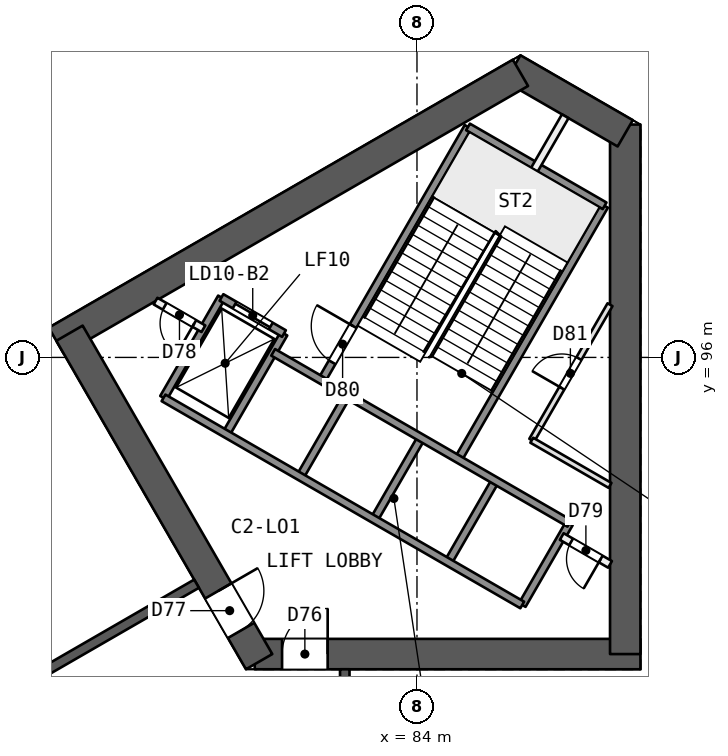
"""IFC4 building model, lengths in metres.
Left out: names, types, materials, properties, quantities, classifications, styles, units other than length and angle.
Written with IfcOpenShell. Run it as: python <this file> out.ifc"""

import sys

from ifc_helpers import new_model, si_unit, direction, frame, frame_2d, origin, place, context, subcontext, project, spatial, rectangle, extrude, element, fill, save


model = new_model("IFC4")
c1 = context("Model", 3, precision=1e-05, world=origin(), true_north=direction((0.0, 1.0)))
c2 = subcontext(c1, "Body", "Model", "MODEL_VIEW")
j1 = project(units=[si_unit("LENGTHUNIT", "METRE"), si_unit("PLANEANGLEUNIT", "RADIAN")], contexts=[c1])
p1 = place(None, origin())
s1 = spatial("IfcSite", under=j1, at=p1, CompositionType="ELEMENT")
p2 = place(p1, origin())
s2 = spatial("IfcBuilding", under=s1, at=p2, CompositionType="ELEMENT")
p3 = place(p2, frame((0.0, 0.0, -9.0)))
s3 = spatial("IfcBuildingStorey", under=s2, at=p3, CompositionType="ELEMENT", Elevation=-9.0)
p4 = place(p3, frame((94.84, 122.4, -0.3), z_axis=(0.0, 0.0, 1.0), x_axis=(-0.866026157749, -0.499998694092, 0.0)))
e1 = element("IfcWall", 1, at=p4, inside=s3, PredefinedType="SOLIDWALL", context=c2, shape_type="SweptSolid", body=[
    extrude(rectangle(XDim=76.937, YDim=0.6, at=frame_2d((38.469, 0.0))), origin(), (0.0, 0.0, 1.0), 4.8),
])
p5 = place(p3, frame((79.731, 88.194, -0.3), z_axis=(0.0, 0.0, 1.0), x_axis=(1.0, 0.0, 0.0)))
e2 = element("IfcWall", 2, at=p5, inside=s3, PredefinedType="SHEAR", context=c2, shape_type="SweptSolid", body=[
    extrude(rectangle(XDim=10.149, YDim=0.8, at=frame_2d((5.074, 0.0))), origin(), (0.0, 0.0, 1.0), 4.8),
])
p6 = place(p5, frame((0.719, 0.0, 0.3)))
e3 = element("IfcOpeningElement", 3, at=p6, cuts=e2, PredefinedType="OPENING", context=c2, shape_type="SweptSolid", body=[
    extrude(rectangle(XDim=1.2, YDim=2.1, at=frame_2d((0.6, 1.05))), frame((0.0, 0.411, 0.0), z_axis=(0.0, -1.0, 0.0), x_axis=(1.0, 0.0, 0.0)), (0.0, 0.0, 1.0), 0.821),
])
p7 = place(p3, frame((89.48, 88.194, -0.3), z_axis=(0.0, 0.0, 1.0), x_axis=(0.0, 1.0, 0.0)))
e4 = element("IfcWall", 4, at=p7, inside=s3, PredefinedType="SHEAR", context=c2, shape_type="SweptSolid", body=[
    extrude(rectangle(XDim=13.933, YDim=0.8, at=frame_2d((6.967, 0.0))), origin(), (0.0, 0.0, 1.0), 4.8),
])
p8 = place(p3, frame((89.48, 101.897, -0.3), z_axis=(0.0, 0.0, 1.0), x_axis=(-0.866034355626, 0.499984494636, 0.0)))
e5 = element("IfcWall", 5, at=p8, inside=s3, PredefinedType="SHEAR", context=c2, shape_type="SweptSolid", body=[
    extrude(rectangle(XDim=3.414, YDim=0.8, at=frame_2d((1.707, 0.0))), origin(), (0.0, 0.0, 1.0), 4.8),
])
p9 = place(p3, frame((86.723, 103.488, -0.3), z_axis=(0.0, 0.0, 1.0), x_axis=(-0.866032504327, -0.499987701298, 0.0)))
e6 = element("IfcWall", 6, at=p9, inside=s3, PredefinedType="SHEAR", context=c2, shape_type="SweptSolid", body=[
    extrude(rectangle(XDim=14.102, YDim=0.8, at=frame_2d((7.051, 0.0))), origin(), (0.0, 0.0, 1.0), 4.8),
])
p10 = place(p3, frame((74.856, 96.637, -0.3), z_axis=(0.0, 0.0, 1.0), x_axis=(0.499993500917, -0.866029155999, 0.0)))
e7 = element("IfcWall", 7, at=p10, inside=s3, PredefinedType="SHEAR", context=c2, shape_type="SweptSolid", body=[
    extrude(rectangle(XDim=9.98, YDim=0.8, at=frame_2d((4.99, 0.0))), origin(), (0.0, 0.0, 1.0), 4.8),
])
p11 = place(p10, frame((7.83, 0.0, 0.3)))
e8 = element("IfcOpeningElement", 8, at=p11, cuts=e7, PredefinedType="OPENING", context=c2, shape_type="SweptSolid", body=[
    extrude(rectangle(XDim=1.2, YDim=2.1, at=frame_2d((0.6, 1.05))), frame((0.0, 0.411, 0.0), z_axis=(0.0, -1.0, 0.0), x_axis=(1.0, 0.0, 0.0)), (0.0, 0.0, 1.0), 0.821),
])
for number, where, z_axis, x_axis in (
    (9, (82.1, 72.206, -0.3), (0.0, 0.0, 1.0), (0.0, 1.0, 0.0)),
    (10, (78.2, 90.046, -0.3), (0.0, 0.0, 1.0), (-0.866, -0.5, 0.0)),
):
    element("IfcWall", number, at=place(p3, frame(where, z_axis=z_axis, x_axis=x_axis)), inside=s3, PredefinedType="SHEAR", context=c2, shape_type="SweptSolid", body=[
        extrude(rectangle(XDim=15.588, YDim=0.25, at=frame_2d((7.794, 0.0))), origin(), (0.0, 0.0, 1.0), 4.5),
    ])
p12 = place(p3, frame((86.77, 89.486, 0.0), z_axis=(0.0, 0.0, 1.0), x_axis=(0.499961042966, 0.86604789447, 0.0)))
e11 = element("IfcWall", 11, at=p12, inside=s3, PredefinedType="SOLIDWALL", context=c2, shape_type="SweptSolid", body=[
    extrude(rectangle(XDim=2.48, YDim=0.2, at=frame_2d((1.24, 0.0))), origin(), (0.0, 0.0, 1.0), 4.2),
])
p13 = place(p3, frame((87.021, 93.821, 0.0), z_axis=(0.0, 0.0, 1.0), x_axis=(0.500028662945, 0.866008854593, 0.0)))
e12 = element("IfcWall", 12, at=p13, inside=s3, PredefinedType="PARTITIONING", context=c2, shape_type="SweptSolid", body=[
    extrude(rectangle(XDim=4.118, YDim=0.15, at=frame_2d((2.059, 0.0))), origin(), (0.0, 0.0, 1.0), 4.2),
])
p14 = place(p13, frame((1.582, 0.0, 0.0)))
e13 = element("IfcOpeningElement", 13, at=p14, cuts=e12, PredefinedType="OPENING", context=c2, shape_type="SweptSolid", body=[
    extrude(rectangle(XDim=0.9, YDim=2.1, at=frame_2d((0.45, 1.05))), frame((0.0, 0.085, 0.0), z_axis=(0.0, -1.0, 0.0), x_axis=(1.0, 0.0, 0.0)), (0.0, 0.0, 1.0), 0.171),
])
p15 = place(p3, frame((84.821, 90.611, 0.0), z_axis=(0.0, 0.0, 1.0), x_axis=(0.499961042966, 0.86604789447, 0.0)))
e14 = element("IfcWall", 14, at=p15, inside=s3, PredefinedType="SOLIDWALL", context=c2, shape_type="SweptSolid", body=[
    extrude(rectangle(XDim=2.48, YDim=0.2, at=frame_2d((1.24, 0.0))), origin(), (0.0, 0.0, 1.0), 4.2),
])
p16 = place(p3, frame((85.087, 93.321, 0.0), z_axis=(0.0, 0.0, 1.0), x_axis=(0.500019787375, 0.866013979237, 0.0)))
e15 = element("IfcWall", 15, at=p16, inside=s3, PredefinedType="SOLIDWALL", context=c2, shape_type="SweptSolid", body=[
    extrude(rectangle(XDim=7.7, YDim=0.2, at=frame_2d((3.85, 0.0))), origin(), (0.0, 0.0, 1.0), 4.2),
])
p17 = place(p3, frame((82.873, 91.736, 0.0), z_axis=(0.0, 0.0, 1.0), x_axis=(0.499961042966, 0.86604789447, 0.0)))
e16 = element("IfcWall", 16, at=p17, inside=s3, PredefinedType="SOLIDWALL", context=c2, shape_type="SweptSolid", body=[
    extrude(rectangle(XDim=2.48, YDim=0.2, at=frame_2d((1.24, 0.0))), origin(), (0.0, 0.0, 1.0), 4.2),
])
p18 = place(p3, frame((87.09, 100.94, 0.0), z_axis=(0.0, 0.0, 1.0), x_axis=(0.499956811548, 0.866050337213, 0.0)))
e17 = element("IfcWall", 17, at=p18, inside=s3, PredefinedType="PARTITIONING", context=c2, shape_type="SweptSolid", body=[
    extrude(rectangle(XDim=1.623, YDim=0.2, at=frame_2d((0.812, 0.0))), origin(), (0.0, 0.0, 1.0), 4.2),
])
p19 = place(p3, frame((80.924, 92.861, 0.0), z_axis=(0.0, 0.0, 1.0), x_axis=(0.499961042966, 0.86604789447, 0.0)))
e18 = element("IfcWall", 18, at=p19, inside=s3, PredefinedType="SOLIDWALL", context=c2, shape_type="SweptSolid", body=[
    extrude(rectangle(XDim=2.48, YDim=0.2, at=frame_2d((1.24, 0.0))), origin(), (0.0, 0.0, 1.0), 4.2),
])
p20 = place(p3, frame((81.493, 95.396, 0.0), z_axis=(0.0, 0.0, 1.0), x_axis=(0.500006057782, 0.866021906294, 0.0)))
e19 = element("IfcWall", 19, at=p20, inside=s3, PredefinedType="SOLIDWALL", context=c2, shape_type="SweptSolid", body=[
    extrude(rectangle(XDim=7.7, YDim=0.2, at=frame_2d((3.85, 0.0))), origin(), (0.0, 0.0, 1.0), 4.2),
])
p21 = place(p20, frame((0.55, 0.0, 0.0)))
e20 = element("IfcOpeningElement", 20, at=p21, cuts=e19, PredefinedType="OPENING", context=c2, shape_type="SweptSolid", body=[
    extrude(rectangle(XDim=1.1, YDim=2.1, at=frame_2d((0.55, 1.05))), frame((0.0, 0.11, 0.0), z_axis=(0.0, -1.0, 0.0), x_axis=(1.0, 0.0, 0.0)), (0.0, 0.0, 1.0), 0.221),
])
for number, where, z_axis, x_axis in (
    (21, (78.976, 93.986, 0.0), (0.0, 0.0, 1.0), (0.5, 0.866, 0.0)),
    (22, (77.33, 94.936, 0.0), (0.0, 0.0, 1.0), (0.5, 0.866, 0.0)),
):
    element("IfcWall", number, at=place(p3, frame(where, z_axis=z_axis, x_axis=x_axis)), inside=s3, PredefinedType="SOLIDWALL", context=c2, shape_type="SweptSolid", body=[
        extrude(rectangle(XDim=3.05, YDim=0.2, at=frame_2d((1.525, 0.0))), origin(), (0.0, 0.0, 1.0), 4.2),
    ])
p22 = place(p3, frame((86.77, 89.486, 0.0), z_axis=(0.0, 0.0, 1.0), x_axis=(-0.86601811187, 0.500012629753, 0.0)))
e23 = element("IfcWall", 23, at=p22, inside=s3, PredefinedType="SOLIDWALL", context=c2, shape_type="SweptSolid", body=[
    extrude(rectangle(XDim=10.9, YDim=0.2, at=frame_2d((5.45, 0.0))), origin(), (0.0, 0.0, 1.0), 4.2),
])
p23 = place(p3, frame((89.08, 90.554, 0.0), z_axis=(0.0, 0.0, 1.0), x_axis=(-0.866022048785, 0.500005810984, 0.0)))
e24 = element("IfcWall", 24, at=p23, inside=s3, PredefinedType="PARTITIONING", context=c2, shape_type="SweptSolid", body=[
    extrude(rectangle(XDim=1.467, YDim=0.2, at=frame_2d((0.733, 0.0))), origin(), (0.0, 0.0, 1.0), 4.2),
])
p24 = place(p23, frame((0.283, 0.0, 0.0)))
e25 = element("IfcOpeningElement", 25, at=p24, cuts=e24, PredefinedType="OPENING", context=c2, shape_type="SweptSolid", body=[
    extrude(rectangle(XDim=0.9, YDim=2.1, at=frame_2d((0.45, 1.05))), frame((0.0, 0.11, 0.0), z_axis=(0.0, -1.0, 0.0), x_axis=(1.0, 0.0, 0.0)), (0.0, 0.0, 1.0), 0.221),
])
p25 = place(p3, frame((78.38, 96.755, 0.0), z_axis=(0.0, 0.0, 1.0), x_axis=(-0.866003949776, 0.500037157592, 0.0)))
e26 = element("IfcWall", 26, at=p25, inside=s3, PredefinedType="PARTITIONING", context=c2, shape_type="SweptSolid", body=[
    extrude(rectangle(XDim=1.455, YDim=0.2, at=frame_2d((0.728, 0.0))), origin(), (0.0, 0.0, 1.0), 4.2),
])
p26 = place(p25, frame((0.278, 0.0, 0.0)))
e27 = element("IfcOpeningElement", 27, at=p26, cuts=e26, PredefinedType="OPENING", context=c2, shape_type="SweptSolid", body=[
    extrude(rectangle(XDim=0.9, YDim=2.1, at=frame_2d((0.45, 1.05))), frame((0.0, 0.11, 0.0), z_axis=(0.0, -1.0, 0.0), x_axis=(1.0, 0.0, 0.0)), (0.0, 0.0, 1.0), 0.221),
])
p27 = place(p3, frame((88.01, 91.634, 0.0), z_axis=(0.0, 0.0, 1.0), x_axis=(-0.866024315419, 0.5000018851, 0.0)))
e28 = element("IfcWall", 28, at=p27, inside=s3, PredefinedType="SOLIDWALL", context=c2, shape_type="SweptSolid", body=[
    extrude(rectangle(XDim=9.0, YDim=0.2, at=frame_2d((4.5, 0.0))), origin(), (0.0, 0.0, 1.0), 4.2),
])
p28 = place(p3, frame((80.5, 96.627, 0.0), z_axis=(0.0, 0.0, 1.0), x_axis=(-0.86601224135, 0.500022797313, 0.0)))
e29 = element("IfcWall", 29, at=p28, inside=s3, PredefinedType="SOLIDWALL", context=c2, shape_type="SweptSolid", body=[
    extrude(rectangle(XDim=1.9, YDim=0.2, at=frame_2d((0.95, 0.0))), origin(), (0.0, 0.0, 1.0), 4.2),
])
p29 = place(p28, frame((0.4, 0.0, 0.0)))
e30 = element("IfcOpeningElement", 30, at=p29, cuts=e29, PredefinedType="OPENING", context=c2, shape_type="SweptSolid", body=[
    extrude(rectangle(XDim=1.1, YDim=2.1, at=frame_2d((0.55, 1.05))), frame((0.0, 0.11, 0.0), z_axis=(0.0, -1.0, 0.0), x_axis=(1.0, 0.0, 0.0)), (0.0, 0.0, 1.0), 0.221),
])
p30 = place(p3, frame((89.08, 92.632, 0.0), z_axis=(0.0, 0.0, 1.0), x_axis=(-0.866041951395, 0.499971337603, 0.0)))
e31 = element("IfcWall", 31, at=p30, inside=s3, PredefinedType="PARTITIONING", context=c2, shape_type="SweptSolid", body=[
    extrude(rectangle(XDim=2.378, YDim=0.15, at=frame_2d((1.189, 0.0))), origin(), (0.0, 0.0, 1.0), 4.2),
])
p31 = place(p3, frame((88.937, 99.99, 0.0), z_axis=(0.0, 0.0, 1.0), x_axis=(-0.866004344652, 0.500036473714, 0.0)))
e32 = element("IfcWall", 32, at=p31, inside=s3, PredefinedType="SOLIDWALL", context=c2, shape_type="SweptSolid", body=[
    extrude(rectangle(XDim=4.15, YDim=0.2, at=frame_2d((2.075, 0.0))), origin(), (0.0, 0.0, 1.0), 4.2),
])
p32 = place(p6, origin())
e33 = element("IfcDoor", 33, at=p32, inside=s3, OperationType="SINGLE_SWING_RIGHT", PredefinedType="NOTDEFINED", context=c2, shape_type="SweptSolid", body=[
    extrude(rectangle(XDim=1.2, YDim=2.1, at=frame_2d((0.6, 1.05))), frame((0.0, 0.025, 0.0), z_axis=(0.0, -1.0, 0.0), x_axis=(1.0, 0.0, 0.0)), (0.0, 0.0, 1.0), 0.05),
])
fill(e3, e33)
p33 = place(p11, origin())
e34 = element("IfcDoor", 34, at=p33, inside=s3, OperationType="SINGLE_SWING_LEFT", PredefinedType="NOTDEFINED", context=c2, shape_type="SweptSolid", body=[
    extrude(rectangle(XDim=1.2, YDim=2.1, at=frame_2d((0.6, 1.05))), frame((0.0, 0.025, 0.0), z_axis=(0.0, -1.0, 0.0), x_axis=(1.0, 0.0, 0.0)), (0.0, 0.0, 1.0), 0.05),
])
fill(e8, e34)
p34 = place(p29, origin())
e35 = element("IfcDoor", 35, at=p34, inside=s3, OperationType="SLIDING_TO_RIGHT", PredefinedType="NOTDEFINED", context=c2, shape_type="SweptSolid", body=[
    extrude(rectangle(XDim=1.1, YDim=2.1, at=frame_2d((0.55, 1.05))), frame((0.0, 0.025, 0.0), z_axis=(0.0, -1.0, 0.0), x_axis=(1.0, 0.0, 0.0)), (0.0, 0.0, 1.0), 0.05),
])
fill(e30, e35)
p35 = place(p26, origin())
e36 = element("IfcDoor", 36, at=p35, inside=s3, OperationType="SINGLE_SWING_LEFT", PredefinedType="NOTDEFINED", context=c2, shape_type="SweptSolid", body=[
    extrude(rectangle(XDim=0.9, YDim=2.1, at=frame_2d((0.45, 1.05))), frame((0.0, 0.025, 0.0), z_axis=(0.0, -1.0, 0.0), x_axis=(1.0, 0.0, 0.0)), (0.0, 0.0, 1.0), 0.05),
])
fill(e27, e36)
p36 = place(p24, origin())
e37 = element("IfcDoor", 37, at=p36, inside=s3, OperationType="SINGLE_SWING_LEFT", PredefinedType="NOTDEFINED", context=c2, shape_type="SweptSolid", body=[
    extrude(rectangle(XDim=0.9, YDim=2.1, at=frame_2d((0.45, 1.05))), frame((0.0, 0.025, 0.0), z_axis=(0.0, -1.0, 0.0), x_axis=(1.0, 0.0, 0.0)), (0.0, 0.0, 1.0), 0.05),
])
fill(e25, e37)
p37 = place(p21, origin())
e38 = element("IfcDoor", 38, at=p37, inside=s3, OperationType="SINGLE_SWING_RIGHT", PredefinedType="NOTDEFINED", context=c2, shape_type="SweptSolid", body=[
    extrude(rectangle(XDim=1.1, YDim=2.1, at=frame_2d((0.55, 1.05))), frame((0.0, 0.025, 0.0), z_axis=(0.0, -1.0, 0.0), x_axis=(1.0, 0.0, 0.0)), (0.0, 0.0, 1.0), 0.05),
])
fill(e20, e38)
p38 = place(p14, origin())
e39 = element("IfcDoor", 39, at=p38, inside=s3, OperationType="SINGLE_SWING_LEFT", PredefinedType="NOTDEFINED", context=c2, shape_type="SweptSolid", body=[
    extrude(rectangle(XDim=0.9, YDim=2.1, at=frame_2d((0.45, 1.05))), frame((0.0, 0.025, 0.0), z_axis=(0.0, -1.0, 0.0), x_axis=(1.0, 0.0, 0.0)), (0.0, 0.0, 1.0), 0.05),
])
fill(e13, e39)
save(model, sys.argv[1])
